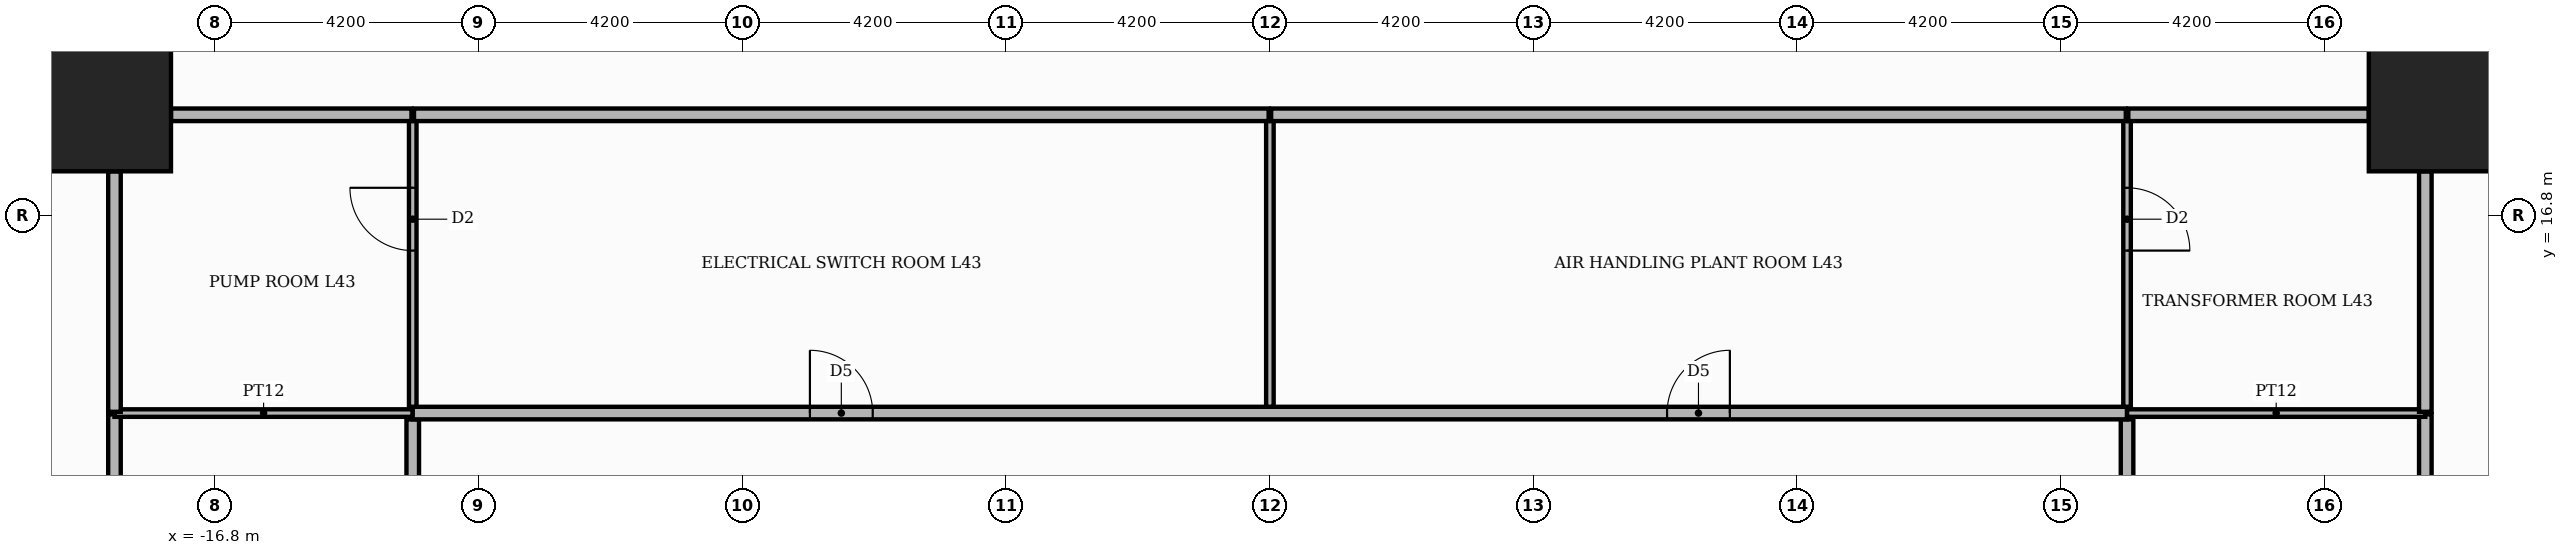
"""IFC4 building model, lengths in metres.
Left out: names, types, materials, properties, quantities, classifications, styles, units other than length and angle.
Written with IfcOpenShell. Run it as: python <this file> out.ifc"""

import sys

from ifc_helpers import new_model, si_unit, direction, frame, frame_2d, origin, origin_2d, place, context, subcontext, project, spatial, rectangle, extrude, element, fill, save


model = new_model("IFC4")
c1 = context("Model", 3, precision=1e-05, world=origin(), true_north=direction((0.0, 1.0)))
c2 = subcontext(c1, "Body", "Model", "MODEL_VIEW")
j1 = project(units=[si_unit("LENGTHUNIT", "METRE"), si_unit("PLANEANGLEUNIT", "RADIAN")], contexts=[c1])
p1 = place(None, origin())
s1 = spatial("IfcSite", under=j1, at=p1, CompositionType="ELEMENT")
p2 = place(p1, origin())
s2 = spatial("IfcBuilding", under=s1, at=p2, CompositionType="ELEMENT")
p3 = place(p2, frame((0.0, 0.0, 180.6)))
s3 = spatial("IfcBuildingStorey", under=s2, at=p3, CompositionType="ELEMENT", Elevation=180.6)
for number, where, z_axis, x_axis in (
    (1, (18.8, 18.8, 0.0), (0.0, 0.0, 1.0), (1.0, 0.0, 0.0)),
    (2, (-18.8, 18.8, 0.0), (0.0, 0.0, 1.0), (1.0, 0.0, 0.0)),
):
    element("IfcColumn", number, at=place(p3, frame(where, z_axis=z_axis, x_axis=x_axis)), inside=s3, PredefinedType="COLUMN", context=c2, shape_type="SweptSolid", body=[
        extrude(rectangle(XDim=2.6, YDim=2.6, at=origin_2d()), origin(), (0.0, 0.0, 1.0), 7.8),
    ])
for number, where, z_axis, x_axis in (
    (3, (-18.4, -17.5, 0.0), (0.0, 0.0, 1.0), (0.0, 1.0, 0.0)),
    (4, (18.4, -17.5, 0.0), (0.0, 0.0, 1.0), (0.0, 1.0, 0.0)),
):
    element("IfcWall", number, at=place(p3, frame(where, z_axis=z_axis, x_axis=x_axis)), inside=s3, PredefinedType="PARTITIONING", context=c2, shape_type="SweptSolid", body=[
        extrude(rectangle(XDim=31.13, YDim=0.2, at=frame_2d((15.565, 0.0))), origin(), (0.0, 0.0, 1.0), 7.38),
    ])
p4 = place(p3, frame((-13.65, -13.55, 0.0), z_axis=(0.0, 0.0, 1.0), x_axis=(0.0, 1.0, 0.0)))
e5 = element("IfcWall", 5, at=p4, inside=s3, PredefinedType="PARTITIONING", context=c2, shape_type="SweptSolid", body=[
    extrude(rectangle(XDim=27.1, YDim=0.2, at=frame_2d((13.55, 0.0))), origin(), (0.0, 0.0, 1.0), 7.38),
])
p5 = place(p4, frame((12.95, 0.0, 0.0)))
e6 = element("IfcOpeningElement", 6, at=p5, cuts=e5, PredefinedType="OPENING", context=c2, shape_type="SweptSolid", body=[
    extrude(rectangle(XDim=1.2, YDim=2.1, at=frame_2d((0.6, 1.05))), frame((0.0, 0.11, 0.0), z_axis=(0.0, -1.0, 0.0), x_axis=(1.0, 0.0, 0.0)), (0.0, 0.0, 1.0), 0.22),
])
p6 = place(p3, frame((13.65, -13.55, 0.0), z_axis=(0.0, 0.0, 1.0), x_axis=(0.0, 1.0, 0.0)))
e7 = element("IfcWall", 7, at=p6, inside=s3, PredefinedType="PARTITIONING", context=c2, shape_type="SweptSolid", body=[
    extrude(rectangle(XDim=27.1, YDim=0.2, at=frame_2d((13.55, 0.0))), origin(), (0.0, 0.0, 1.0), 7.38),
])
p7 = place(p3, frame((-18.4, 13.65, 0.0), z_axis=(0.0, 0.0, 1.0), x_axis=(1.0, 0.0, 0.0)))
e8 = element("IfcWall", 8, at=p7, inside=s3, PredefinedType="PARTITIONING", context=c2, shape_type="SweptSolid", body=[
    extrude(rectangle(XDim=4.75, YDim=0.12, at=frame_2d((2.375, 0.0))), origin(), (0.0, 0.0, 1.0), 7.38),
])
p8 = place(p3, frame((-13.65, 13.65, 0.0), z_axis=(0.0, 0.0, 1.0), x_axis=(1.0, 0.0, 0.0)))
e9 = element("IfcWall", 9, at=p8, inside=s3, PredefinedType="PARTITIONING", context=c2, shape_type="SweptSolid", body=[
    extrude(rectangle(XDim=27.3, YDim=0.2, at=frame_2d((13.65, 0.0))), origin(), (0.0, 0.0, 1.0), 7.38),
])
p9 = place(p8, frame((6.325, 0.0, 0.0)))
e10 = element("IfcOpeningElement", 10, at=p9, cuts=e9, PredefinedType="OPENING", context=c2, shape_type="SweptSolid", body=[
    extrude(rectangle(XDim=1.0, YDim=2.1, at=frame_2d((0.5, 1.05))), frame((0.0, 0.11, 0.0), z_axis=(0.0, -1.0, 0.0), x_axis=(1.0, 0.0, 0.0)), (0.0, 0.0, 1.0), 0.22),
])
p10 = place(p8, frame((19.975, 0.0, 0.0)))
e11 = element("IfcOpeningElement", 11, at=p10, cuts=e9, PredefinedType="OPENING", context=c2, shape_type="SweptSolid", body=[
    extrude(rectangle(XDim=1.0, YDim=2.1, at=frame_2d((0.5, 1.05))), frame((0.0, 0.11, 0.0), z_axis=(0.0, -1.0, 0.0), x_axis=(1.0, 0.0, 0.0)), (0.0, 0.0, 1.0), 0.22),
])
p11 = place(p3, frame((13.65, 13.65, 0.0), z_axis=(0.0, 0.0, 1.0), x_axis=(1.0, 0.0, 0.0)))
e12 = element("IfcWall", 12, at=p11, inside=s3, PredefinedType="PARTITIONING", context=c2, shape_type="SweptSolid", body=[
    extrude(rectangle(XDim=4.75, YDim=0.12, at=frame_2d((2.375, 0.0))), origin(), (0.0, 0.0, 1.0), 7.38),
])
for number, where, z_axis, x_axis in (
    (13, (-18.4, 13.67, 0.0), (0.0, 0.0, 1.0), (0.0, 1.0, 0.0)),
    (14, (18.4, 13.67, 0.0), (0.0, 0.0, 1.0), (0.0, 1.0, 0.0)),
):
    element("IfcWall", number, at=place(p3, frame(where, z_axis=z_axis, x_axis=x_axis)), inside=s3, PredefinedType="PARTITIONING", context=c2, shape_type="SweptSolid", body=[
        extrude(rectangle(XDim=3.83, YDim=0.2, at=frame_2d((1.915, 0.0))), origin(), (0.0, 0.0, 1.0), 7.38),
    ])
p12 = place(p3, frame((-13.65, 13.75, 0.0), z_axis=(0.0, 0.0, 1.0), x_axis=(0.0, 1.0, 0.0)))
e15 = element("IfcWall", 15, at=p12, inside=s3, PredefinedType="PARTITIONING", context=c2, shape_type="SweptSolid", body=[
    extrude(rectangle(XDim=4.65, YDim=0.12, at=frame_2d((2.325, 0.0))), origin(), (0.0, 0.0, 1.0), 7.38),
])
p13 = place(p12, frame((2.488, 0.0, 0.0)))
e16 = element("IfcOpeningElement", 16, at=p13, cuts=e15, PredefinedType="OPENING", context=c2, shape_type="SweptSolid", body=[
    extrude(rectangle(XDim=1.0, YDim=2.1, at=frame_2d((0.5, 1.05))), frame((0.0, 0.07, 0.0), z_axis=(0.0, -1.0, 0.0), x_axis=(1.0, 0.0, 0.0)), (0.0, 0.0, 1.0), 0.14),
])
p14 = place(p3, frame((0.0, 13.75, 0.0), z_axis=(0.0, 0.0, 1.0), x_axis=(0.0, 1.0, 0.0)))
e17 = element("IfcWall", 17, at=p14, inside=s3, PredefinedType="PARTITIONING", context=c2, shape_type="SweptSolid", body=[
    extrude(rectangle(XDim=4.65, YDim=0.12, at=frame_2d((2.325, 0.0))), origin(), (0.0, 0.0, 1.0), 7.38),
])
p15 = place(p3, frame((13.65, 13.75, 0.0), z_axis=(0.0, 0.0, 1.0), x_axis=(0.0, 1.0, 0.0)))
e18 = element("IfcWall", 18, at=p15, inside=s3, PredefinedType="PARTITIONING", context=c2, shape_type="SweptSolid", body=[
    extrude(rectangle(XDim=4.65, YDim=0.12, at=frame_2d((2.325, 0.0))), origin(), (0.0, 0.0, 1.0), 7.38),
])
p16 = place(p15, frame((2.488, 0.0, 0.0)))
e19 = element("IfcOpeningElement", 19, at=p16, cuts=e18, PredefinedType="OPENING", context=c2, shape_type="SweptSolid", body=[
    extrude(rectangle(XDim=1.0, YDim=2.1, at=frame_2d((0.5, 1.05))), frame((0.0, 0.07, 0.0), z_axis=(0.0, -1.0, 0.0), x_axis=(1.0, 0.0, 0.0)), (0.0, 0.0, 1.0), 0.14),
])
p17 = place(p3, frame((-17.5, 18.4, 0.0), z_axis=(0.0, 0.0, 1.0), x_axis=(1.0, 0.0, 0.0)))
e20 = element("IfcWall", 20, at=p17, inside=s3, PredefinedType="PARTITIONING", context=c2, shape_type="SweptSolid", body=[
    extrude(rectangle(XDim=3.83, YDim=0.2, at=frame_2d((1.915, 0.0))), origin(), (0.0, 0.0, 1.0), 7.38),
])
for number, where, z_axis, x_axis in (
    (21, (-13.63, 18.4, 0.0), (0.0, 0.0, 1.0), (1.0, 0.0, 0.0)),
    (22, (0.02, 18.4, 0.0), (0.0, 0.0, 1.0), (1.0, 0.0, 0.0)),
):
    element("IfcWall", number, at=place(p3, frame(where, z_axis=z_axis, x_axis=x_axis)), inside=s3, PredefinedType="PARTITIONING", context=c2, shape_type="SweptSolid", body=[
        extrude(rectangle(XDim=13.61, YDim=0.2, at=frame_2d((6.805, 0.0))), origin(), (0.0, 0.0, 1.0), 7.38),
    ])
p18 = place(p3, frame((13.67, 18.4, 0.0), z_axis=(0.0, 0.0, 1.0), x_axis=(1.0, 0.0, 0.0)))
e23 = element("IfcWall", 23, at=p18, inside=s3, PredefinedType="PARTITIONING", context=c2, shape_type="SweptSolid", body=[
    extrude(rectangle(XDim=3.83, YDim=0.2, at=frame_2d((1.915, 0.0))), origin(), (0.0, 0.0, 1.0), 7.38),
])
p19 = place(p9, origin())
e24 = element("IfcDoor", 24, at=p19, inside=s3, OperationType="SINGLE_SWING_LEFT", PredefinedType="DOOR", context=c2, shape_type="SweptSolid", body=[
    extrude(rectangle(XDim=1.0, YDim=2.1, at=frame_2d((0.5, 1.05))), frame((0.0, 0.025, 0.0), z_axis=(0.0, -1.0, 0.0), x_axis=(1.0, 0.0, 0.0)), (0.0, 0.0, 1.0), 0.05),
])
fill(e10, e24)
p20 = place(p10, origin())
e25 = element("IfcDoor", 25, at=p20, inside=s3, OperationType="SINGLE_SWING_RIGHT", PredefinedType="DOOR", context=c2, shape_type="SweptSolid", body=[
    extrude(rectangle(XDim=1.0, YDim=2.1, at=frame_2d((0.5, 1.05))), frame((0.0, 0.025, 0.0), z_axis=(0.0, -1.0, 0.0), x_axis=(1.0, 0.0, 0.0)), (0.0, 0.0, 1.0), 0.05),
])
fill(e11, e25)
p21 = place(p13, origin())
e26 = element("IfcDoor", 26, at=p21, inside=s3, OperationType="SINGLE_SWING_RIGHT", PredefinedType="DOOR", context=c2, shape_type="SweptSolid", body=[
    extrude(rectangle(XDim=1.0, YDim=2.1, at=frame_2d((0.5, 1.05))), frame((0.0, 0.025, 0.0), z_axis=(0.0, -1.0, 0.0), x_axis=(1.0, 0.0, 0.0)), (0.0, 0.0, 1.0), 0.05),
])
fill(e16, e26)
p22 = place(p16, frame((1.0, 0.0, 0.0), z_axis=(0.0, 0.0, 1.0), x_axis=(-1.0, 0.0, 0.0)))
e27 = element("IfcDoor", 27, at=p22, inside=s3, OperationType="SINGLE_SWING_LEFT", PredefinedType="DOOR", context=c2, shape_type="SweptSolid", body=[
    extrude(rectangle(XDim=1.0, YDim=2.1, at=frame_2d((0.5, 1.05))), frame((0.0, 0.025, 0.0), z_axis=(0.0, -1.0, 0.0), x_axis=(1.0, 0.0, 0.0)), (0.0, 0.0, 1.0), 0.05),
])
fill(e19, e27)
save(model, sys.argv[1])
